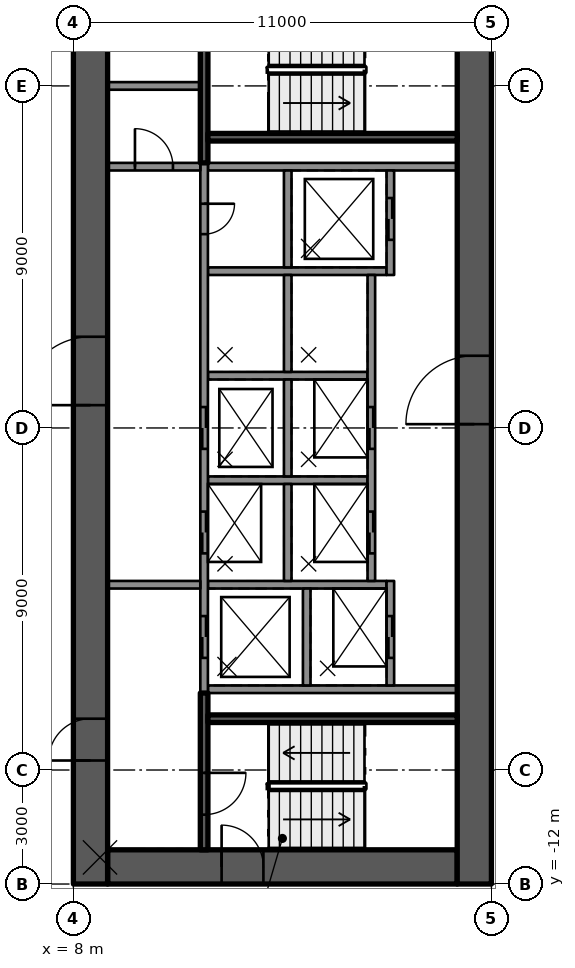
"""IFC4 building model, lengths in metres.
Left out: names, types, materials, properties, quantities, classifications, styles, units other than length and angle.
Written with IfcOpenShell. Run it as: python <this file> out.ifc"""

import sys

from ifc_helpers import new_model, si_unit, direction, frame, frame_2d, origin, place, context, subcontext, project, spatial, rectangle, extrude, element, fill, save


model = new_model("IFC4")
c1 = context("Model", 3, precision=1e-05, world=origin(), true_north=direction((0.0, 1.0)))
c2 = subcontext(c1, "Body", "Model", "MODEL_VIEW")
j1 = project(units=[si_unit("LENGTHUNIT", "METRE"), si_unit("PLANEANGLEUNIT", "RADIAN")], contexts=[c1])
p1 = place(None, origin())
s1 = spatial("IfcSite", under=j1, at=p1, CompositionType="ELEMENT")
p2 = place(p1, origin())
s2 = spatial("IfcBuilding", under=s1, at=p2, CompositionType="ELEMENT")
p3 = place(p2, frame((0.0, 0.0, 105.7)))
s3 = spatial("IfcBuildingStorey", under=s2, at=p3, CompositionType="ELEMENT", Elevation=105.7)
p4 = place(p3, frame((8.9, -11.55, 0.0), z_axis=(0.0, 0.0, 1.0), x_axis=(1.0, 0.0, 0.0)))
e1 = element("IfcWall", 1, at=p4, inside=s3, PredefinedType="SHEAR", context=c2, shape_type="SweptSolid", body=[
    extrude(rectangle(XDim=9.2, YDim=0.9, at=frame_2d((4.6, 0.0))), origin(), (0.0, 0.0, 1.0), 3.5),
])
p5 = place(p4, frame((3.0, 0.0, 0.0)))
e2 = element("IfcOpeningElement", 2, at=p5, cuts=e1, PredefinedType="OPENING", context=c2, shape_type="SweptSolid", body=[
    extrude(rectangle(XDim=1.1, YDim=2.1, at=frame_2d((0.55, 1.05))), frame((0.0, 0.46, 0.0), z_axis=(0.0, -1.0, 0.0), x_axis=(1.0, 0.0, 0.0)), (0.0, 0.0, 1.0), 0.92),
])
p6 = place(p3, frame((8.45, -12.0, 0.0), z_axis=(0.0, 0.0, 1.0), x_axis=(0.0, 1.0, 0.0)))
e3 = element("IfcWall", 3, at=p6, inside=s3, PredefinedType="SHEAR", context=c2, shape_type="SweptSolid", body=[
    extrude(rectangle(XDim=24.0, YDim=0.9, at=frame_2d((12.0, 0.0))), origin(), (0.0, 0.0, 1.0), 3.5),
])
p7 = place(p6, frame((12.6, 0.0, 0.0)))
e4 = element("IfcOpeningElement", 4, at=p7, cuts=e3, PredefinedType="OPENING", context=c2, shape_type="SweptSolid", body=[
    extrude(rectangle(XDim=1.8, YDim=2.1, at=frame_2d((0.9, 1.05))), frame((0.0, 0.46, 0.0), z_axis=(0.0, -1.0, 0.0), x_axis=(1.0, 0.0, 0.0)), (0.0, 0.0, 1.0), 0.92),
])
p8 = place(p6, frame((3.25, 0.0, 0.0)))
e5 = element("IfcOpeningElement", 5, at=p8, cuts=e3, PredefinedType="OPENING", context=c2, shape_type="SweptSolid", body=[
    extrude(rectangle(XDim=1.1, YDim=2.1, at=frame_2d((0.55, 1.05))), frame((0.0, 0.46, 0.0), z_axis=(0.0, -1.0, 0.0), x_axis=(1.0, 0.0, 0.0)), (0.0, 0.0, 1.0), 0.92),
])
p9 = place(p3, frame((18.55, -12.0, 0.0), z_axis=(0.0, 0.0, 1.0), x_axis=(0.0, 1.0, 0.0)))
e6 = element("IfcWall", 6, at=p9, inside=s3, PredefinedType="SHEAR", context=c2, shape_type="SweptSolid", body=[
    extrude(rectangle(XDim=24.0, YDim=0.9, at=frame_2d((12.0, 0.0))), origin(), (0.0, 0.0, 1.0), 3.5),
])
p10 = place(p9, frame((12.1, 0.0, 0.0)))
e7 = element("IfcOpeningElement", 7, at=p10, cuts=e6, PredefinedType="OPENING", context=c2, shape_type="SweptSolid", body=[
    extrude(rectangle(XDim=1.8, YDim=2.1, at=frame_2d((0.9, 1.05))), frame((0.0, 0.46, 0.0), z_axis=(0.0, -1.0, 0.0), x_axis=(1.0, 0.0, 0.0)), (0.0, 0.0, 1.0), 0.92),
])
for number, where, z_axis, x_axis in (
    (8, (11.54, -6.875, 0.0), (0.0, 0.0, 1.0), (1.0, 0.0, 0.0)),
    (9, (11.54, 6.875, 0.0), (0.0, 0.0, 1.0), (1.0, 0.0, 0.0)),
):
    element("IfcWall", number, at=place(p3, frame(where, z_axis=z_axis, x_axis=x_axis)), inside=s3, PredefinedType="SOLIDWALL", context=c2, shape_type="SweptSolid", body=[
        extrude(rectangle(XDim=6.56, YDim=0.2, at=frame_2d((3.28, 0.0))), origin(), (0.0, 0.0, 1.0), 3.09),
    ])
p11 = place(p3, frame((11.54, 4.125, 0.0), z_axis=(0.0, 0.0, 1.0), x_axis=(1.0, 0.0, 0.0)))
e10 = element("IfcWall", 10, at=p11, inside=s3, PredefinedType="SOLIDWALL", context=c2, shape_type="SweptSolid", body=[
    extrude(rectangle(XDim=4.7, YDim=0.2, at=frame_2d((2.35, 0.0))), origin(), (0.0, 0.0, 1.0), 3.09),
])
for number, where, z_axis, x_axis in (
    (11, (11.54, 1.375, 0.0), (0.0, 0.0, 1.0), (1.0, 0.0, 0.0)),
    (12, (11.54, -1.375, 0.0), (0.0, 0.0, 1.0), (1.0, 0.0, 0.0)),
):
    element("IfcWall", number, at=place(p3, frame(where, z_axis=z_axis, x_axis=x_axis)), inside=s3, PredefinedType="SOLIDWALL", context=c2, shape_type="SweptSolid", body=[
        extrude(rectangle(XDim=4.2, YDim=0.2, at=frame_2d((2.1, 0.0))), origin(), (0.0, 0.0, 1.0), 3.09),
    ])
p12 = place(p3, frame((11.54, -4.125, 0.0), z_axis=(0.0, 0.0, 1.0), x_axis=(1.0, 0.0, 0.0)))
e13 = element("IfcWall", 13, at=p12, inside=s3, PredefinedType="SOLIDWALL", context=c2, shape_type="SweptSolid", body=[
    extrude(rectangle(XDim=4.7, YDim=0.2, at=frame_2d((2.35, 0.0))), origin(), (0.0, 0.0, 1.0), 3.09),
])
p13 = place(p3, frame((11.44, 6.975, 0.0), z_axis=(0.0, 0.0, 1.0), x_axis=(0.0, -1.0, 0.0)))
e14 = element("IfcWall", 14, at=p13, inside=s3, PredefinedType="SOLIDWALL", context=c2, shape_type="SweptSolid", body=[
    extrude(rectangle(XDim=13.95, YDim=0.2, at=frame_2d((6.975, 0.0))), origin(), (0.0, 0.0, 1.0), 3.09),
])
p14 = place(p13, frame((6.425, 0.0, 0.0)))
e15 = element("IfcOpeningElement", 15, at=p14, cuts=e14, PredefinedType="OPENING", context=c2, shape_type="SweptSolid", body=[
    extrude(rectangle(XDim=1.1, YDim=2.1, at=frame_2d((0.55, 1.05))), frame((0.0, 0.11, 0.0), z_axis=(0.0, -1.0, 0.0), x_axis=(1.0, 0.0, 0.0)), (0.0, 0.0, 1.0), 0.22),
])
p15 = place(p13, frame((9.175, 0.0, 0.0)))
e16 = element("IfcOpeningElement", 16, at=p15, cuts=e14, PredefinedType="OPENING", context=c2, shape_type="SweptSolid", body=[
    extrude(rectangle(XDim=1.1, YDim=2.1, at=frame_2d((0.55, 1.05))), frame((0.0, 0.11, 0.0), z_axis=(0.0, -1.0, 0.0), x_axis=(1.0, 0.0, 0.0)), (0.0, 0.0, 1.0), 0.22),
])
p16 = place(p13, frame((11.925, 0.0, 0.0)))
e17 = element("IfcOpeningElement", 17, at=p16, cuts=e14, PredefinedType="OPENING", context=c2, shape_type="SweptSolid", body=[
    extrude(rectangle(XDim=1.1, YDim=2.1, at=frame_2d((0.55, 1.05))), frame((0.0, 0.11, 0.0), z_axis=(0.0, -1.0, 0.0), x_axis=(1.0, 0.0, 0.0)), (0.0, 0.0, 1.0), 0.22),
])
p17 = place(p13, frame((1.075, 0.0, 0.0)))
e18 = element("IfcOpeningElement", 18, at=p17, cuts=e14, PredefinedType="OPENING", context=c2, shape_type="SweptSolid", body=[
    extrude(rectangle(XDim=0.8, YDim=2.1, at=frame_2d((0.4, 1.05))), frame((0.0, 0.11, 0.0), z_axis=(0.0, -1.0, 0.0), x_axis=(1.0, 0.0, 0.0)), (0.0, 0.0, 1.0), 0.22),
])
for number, where, z_axis, x_axis in (
    (19, (13.64, 6.775, 0.0), (0.0, 0.0, 1.0), (0.0, -1.0, 0.0)),
    (20, (13.64, 4.025, 0.0), (0.0, 0.0, 1.0), (0.0, -1.0, 0.0)),
    (21, (13.64, 1.275, 0.0), (0.0, 0.0, 1.0), (0.0, -1.0, 0.0)),
    (22, (13.64, -1.475, 0.0), (0.0, 0.0, 1.0), (0.0, -1.0, 0.0)),
    (23, (14.14, -4.225, 0.0), (0.0, 0.0, 1.0), (0.0, -1.0, 0.0)),
):
    element("IfcWall", number, at=place(p3, frame(where, z_axis=z_axis, x_axis=x_axis)), inside=s3, PredefinedType="SOLIDWALL", context=c2, shape_type="SweptSolid", body=[
        extrude(rectangle(XDim=2.55, YDim=0.2, at=frame_2d((1.275, 0.0))), origin(), (0.0, 0.0, 1.0), 3.09),
    ])
p18 = place(p3, frame((16.34, 6.775, 0.0), z_axis=(0.0, 0.0, 1.0), x_axis=(0.0, -1.0, 0.0)))
e24 = element("IfcWall", 24, at=p18, inside=s3, PredefinedType="SOLIDWALL", context=c2, shape_type="SweptSolid", body=[
    extrude(rectangle(XDim=2.75, YDim=0.2, at=frame_2d((1.375, 0.0))), origin(), (0.0, 0.0, 1.0), 3.09),
])
p19 = place(p18, frame((0.725, 0.0, 0.0)))
e25 = element("IfcOpeningElement", 25, at=p19, cuts=e24, PredefinedType="OPENING", context=c2, shape_type="SweptSolid", body=[
    extrude(rectangle(XDim=1.1, YDim=2.1, at=frame_2d((0.55, 1.05))), frame((0.0, 0.11, 0.0), z_axis=(0.0, -1.0, 0.0), x_axis=(1.0, 0.0, 0.0)), (0.0, 0.0, 1.0), 0.22),
])
p20 = place(p3, frame((15.84, 4.025, 0.0), z_axis=(0.0, 0.0, 1.0), x_axis=(0.0, -1.0, 0.0)))
e26 = element("IfcWall", 26, at=p20, inside=s3, PredefinedType="SOLIDWALL", context=c2, shape_type="SweptSolid", body=[
    extrude(rectangle(XDim=8.05, YDim=0.2, at=frame_2d((4.025, 0.0))), origin(), (0.0, 0.0, 1.0), 3.09),
])
p21 = place(p20, frame((3.475, 0.0, 0.0)))
e27 = element("IfcOpeningElement", 27, at=p21, cuts=e26, PredefinedType="OPENING", context=c2, shape_type="SweptSolid", body=[
    extrude(rectangle(XDim=1.1, YDim=2.1, at=frame_2d((0.55, 1.05))), frame((0.0, 0.11, 0.0), z_axis=(0.0, -1.0, 0.0), x_axis=(1.0, 0.0, 0.0)), (0.0, 0.0, 1.0), 0.22),
])
p22 = place(p20, frame((6.225, 0.0, 0.0)))
e28 = element("IfcOpeningElement", 28, at=p22, cuts=e26, PredefinedType="OPENING", context=c2, shape_type="SweptSolid", body=[
    extrude(rectangle(XDim=1.1, YDim=2.1, at=frame_2d((0.55, 1.05))), frame((0.0, 0.11, 0.0), z_axis=(0.0, -1.0, 0.0), x_axis=(1.0, 0.0, 0.0)), (0.0, 0.0, 1.0), 0.22),
])
p23 = place(p3, frame((16.34, -4.025, 0.0), z_axis=(0.0, 0.0, 1.0), x_axis=(0.0, -1.0, 0.0)))
e29 = element("IfcWall", 29, at=p23, inside=s3, PredefinedType="SOLIDWALL", context=c2, shape_type="SweptSolid", body=[
    extrude(rectangle(XDim=2.75, YDim=0.2, at=frame_2d((1.375, 0.0))), origin(), (0.0, 0.0, 1.0), 3.09),
])
p24 = place(p23, frame((0.925, 0.0, 0.0)))
e30 = element("IfcOpeningElement", 30, at=p24, cuts=e29, PredefinedType="OPENING", context=c2, shape_type="SweptSolid", body=[
    extrude(rectangle(XDim=1.1, YDim=2.1, at=frame_2d((0.55, 1.05))), frame((0.0, 0.11, 0.0), z_axis=(0.0, -1.0, 0.0), x_axis=(1.0, 0.0, 0.0)), (0.0, 0.0, 1.0), 0.22),
])
p25 = place(p3, frame((11.44, -6.975, 0.0), z_axis=(0.0, 0.0, 1.0), x_axis=(0.0, -1.0, 0.0)))
e31 = element("IfcWall", 31, at=p25, inside=s3, PredefinedType="SOLIDWALL", context=c2, shape_type="SweptSolid", body=[
    extrude(rectangle(XDim=4.125, YDim=0.2, at=frame_2d((2.062, 0.0))), origin(), (0.0, 0.0, 1.0), 3.09),
])
p26 = place(p25, frame((2.1, 0.0, 0.0)))
e32 = element("IfcOpeningElement", 32, at=p26, cuts=e31, PredefinedType="OPENING", context=c2, shape_type="SweptSolid", body=[
    extrude(rectangle(XDim=1.1, YDim=2.1, at=frame_2d((0.55, 1.05))), frame((0.0, 0.11, 0.0), z_axis=(0.0, -1.0, 0.0), x_axis=(1.0, 0.0, 0.0)), (0.0, 0.0, 1.0), 0.22),
])
p27 = place(p3, frame((11.54, -7.65, 0.0), z_axis=(0.0, 0.0, 1.0), x_axis=(1.0, 0.0, 0.0)))
e33 = element("IfcWall", 33, at=p27, inside=s3, PredefinedType="SOLIDWALL", context=c2, shape_type="SweptSolid", body=[
    extrude(rectangle(XDim=6.56, YDim=0.2, at=frame_2d((3.28, 0.0))), origin(), (0.0, 0.0, 1.0), 3.09),
])
p28 = place(p3, frame((11.44, 11.1, 0.0), z_axis=(0.0, 0.0, 1.0), x_axis=(0.0, -1.0, 0.0)))
e34 = element("IfcWall", 34, at=p28, inside=s3, PredefinedType="SOLIDWALL", context=c2, shape_type="SweptSolid", body=[
    extrude(rectangle(XDim=4.125, YDim=0.2, at=frame_2d((2.062, 0.0))), origin(), (0.0, 0.0, 1.0), 3.09),
])
p29 = place(p3, frame((11.54, 7.65, 0.0), z_axis=(0.0, 0.0, 1.0), x_axis=(1.0, 0.0, 0.0)))
e35 = element("IfcWall", 35, at=p29, inside=s3, PredefinedType="SOLIDWALL", context=c2, shape_type="SweptSolid", body=[
    extrude(rectangle(XDim=6.56, YDim=0.2, at=frame_2d((3.28, 0.0))), origin(), (0.0, 0.0, 1.0), 3.09),
])
p30 = place(p3, frame((8.9, -4.125, 0.0), z_axis=(0.0, 0.0, 1.0), x_axis=(1.0, 0.0, 0.0)))
e36 = element("IfcWall", 36, at=p30, inside=s3, PredefinedType="PARTITIONING", context=c2, shape_type="SweptSolid", body=[
    extrude(rectangle(XDim=2.44, YDim=0.2, at=frame_2d((1.22, 0.0))), origin(), (0.0, 0.0, 1.0), 3.09),
])
p31 = place(p3, frame((8.9, 6.875, 0.0), z_axis=(0.0, 0.0, 1.0), x_axis=(1.0, 0.0, 0.0)))
e37 = element("IfcWall", 37, at=p31, inside=s3, PredefinedType="PARTITIONING", context=c2, shape_type="SweptSolid", body=[
    extrude(rectangle(XDim=2.44, YDim=0.2, at=frame_2d((1.22, 0.0))), origin(), (0.0, 0.0, 1.0), 3.09),
])
p32 = place(p31, frame((0.72, 0.0, 0.0)))
e38 = element("IfcOpeningElement", 38, at=p32, cuts=e37, PredefinedType="OPENING", context=c2, shape_type="SweptSolid", body=[
    extrude(rectangle(XDim=1.0, YDim=2.1, at=frame_2d((0.5, 1.05))), frame((0.0, 0.11, 0.0), z_axis=(0.0, -1.0, 0.0), x_axis=(1.0, 0.0, 0.0)), (0.0, 0.0, 1.0), 0.22),
])
p33 = place(p3, frame((8.9, 9.0, 0.0), z_axis=(0.0, 0.0, 1.0), x_axis=(1.0, 0.0, 0.0)))
e39 = element("IfcWall", 39, at=p33, inside=s3, PredefinedType="PARTITIONING", context=c2, shape_type="SweptSolid", body=[
    extrude(rectangle(XDim=2.44, YDim=0.2, at=frame_2d((1.22, 0.0))), origin(), (0.0, 0.0, 1.0), 3.09),
])
p34 = place(p19, origin())
e40 = element("IfcDoor", 40, at=p34, inside=s3, OperationType="DOUBLE_DOOR_SLIDING", PredefinedType="DOOR", context=c2, shape_type="SweptSolid", body=[
    extrude(rectangle(XDim=1.1, YDim=2.1, at=frame_2d((0.55, 1.05))), frame((0.0, 0.025, 0.0), z_axis=(0.0, -1.0, 0.0), x_axis=(1.0, 0.0, 0.0)), (0.0, 0.0, 1.0), 0.05),
])
fill(e25, e40)
p35 = place(p14, origin())
e41 = element("IfcDoor", 41, at=p35, inside=s3, OperationType="DOUBLE_DOOR_SLIDING", PredefinedType="DOOR", context=c2, shape_type="SweptSolid", body=[
    extrude(rectangle(XDim=1.1, YDim=2.1, at=frame_2d((0.55, 1.05))), frame((0.0, 0.025, 0.0), z_axis=(0.0, -1.0, 0.0), x_axis=(1.0, 0.0, 0.0)), (0.0, 0.0, 1.0), 0.05),
])
fill(e15, e41)
p36 = place(p21, origin())
e42 = element("IfcDoor", 42, at=p36, inside=s3, OperationType="DOUBLE_DOOR_SLIDING", PredefinedType="DOOR", context=c2, shape_type="SweptSolid", body=[
    extrude(rectangle(XDim=1.1, YDim=2.1, at=frame_2d((0.55, 1.05))), frame((0.0, 0.025, 0.0), z_axis=(0.0, -1.0, 0.0), x_axis=(1.0, 0.0, 0.0)), (0.0, 0.0, 1.0), 0.05),
])
fill(e27, e42)
p37 = place(p15, origin())
e43 = element("IfcDoor", 43, at=p37, inside=s3, OperationType="DOUBLE_DOOR_SLIDING", PredefinedType="DOOR", context=c2, shape_type="SweptSolid", body=[
    extrude(rectangle(XDim=1.1, YDim=2.1, at=frame_2d((0.55, 1.05))), frame((0.0, 0.025, 0.0), z_axis=(0.0, -1.0, 0.0), x_axis=(1.0, 0.0, 0.0)), (0.0, 0.0, 1.0), 0.05),
])
fill(e16, e43)
p38 = place(p22, origin())
e44 = element("IfcDoor", 44, at=p38, inside=s3, OperationType="DOUBLE_DOOR_SLIDING", PredefinedType="DOOR", context=c2, shape_type="SweptSolid", body=[
    extrude(rectangle(XDim=1.1, YDim=2.1, at=frame_2d((0.55, 1.05))), frame((0.0, 0.025, 0.0), z_axis=(0.0, -1.0, 0.0), x_axis=(1.0, 0.0, 0.0)), (0.0, 0.0, 1.0), 0.05),
])
fill(e28, e44)
p39 = place(p16, origin())
e45 = element("IfcDoor", 45, at=p39, inside=s3, OperationType="DOUBLE_DOOR_SLIDING", PredefinedType="DOOR", context=c2, shape_type="SweptSolid", body=[
    extrude(rectangle(XDim=1.1, YDim=2.1, at=frame_2d((0.55, 1.05))), frame((0.0, 0.025, 0.0), z_axis=(0.0, -1.0, 0.0), x_axis=(1.0, 0.0, 0.0)), (0.0, 0.0, 1.0), 0.05),
])
fill(e17, e45)
p40 = place(p24, origin())
e46 = element("IfcDoor", 46, at=p40, inside=s3, OperationType="DOUBLE_DOOR_SLIDING", PredefinedType="DOOR", context=c2, shape_type="SweptSolid", body=[
    extrude(rectangle(XDim=1.1, YDim=2.1, at=frame_2d((0.55, 1.05))), frame((0.0, 0.025, 0.0), z_axis=(0.0, -1.0, 0.0), x_axis=(1.0, 0.0, 0.0)), (0.0, 0.0, 1.0), 0.05),
])
fill(e30, e46)
p41 = place(p17, origin())
e47 = element("IfcDoor", 47, at=p41, inside=s3, OperationType="SINGLE_SWING_LEFT", PredefinedType="DOOR", context=c2, shape_type="SweptSolid", body=[
    extrude(rectangle(XDim=0.8, YDim=2.1, at=frame_2d((0.4, 1.05))), frame((0.0, 0.025, 0.0), z_axis=(0.0, -1.0, 0.0), x_axis=(1.0, 0.0, 0.0)), (0.0, 0.0, 1.0), 0.05),
])
fill(e18, e47)
p42 = place(p7, origin())
e48 = element("IfcDoor", 48, at=p42, inside=s3, OperationType="SINGLE_SWING_RIGHT", PredefinedType="DOOR", context=c2, shape_type="SweptSolid", body=[
    extrude(rectangle(XDim=1.8, YDim=2.1, at=frame_2d((0.9, 1.05))), frame((0.0, 0.025, 0.0), z_axis=(0.0, -1.0, 0.0), x_axis=(1.0, 0.0, 0.0)), (0.0, 0.0, 1.0), 0.05),
])
fill(e4, e48)
p43 = place(p10, origin())
e49 = element("IfcDoor", 49, at=p43, inside=s3, OperationType="SINGLE_SWING_RIGHT", PredefinedType="DOOR", context=c2, shape_type="SweptSolid", body=[
    extrude(rectangle(XDim=1.8, YDim=2.1, at=frame_2d((0.9, 1.05))), frame((0.0, 0.025, 0.0), z_axis=(0.0, -1.0, 0.0), x_axis=(1.0, 0.0, 0.0)), (0.0, 0.0, 1.0), 0.05),
])
fill(e7, e49)
p44 = place(p8, origin())
e50 = element("IfcDoor", 50, at=p44, inside=s3, OperationType="SINGLE_SWING_LEFT", PredefinedType="DOOR", context=c2, shape_type="SweptSolid", body=[
    extrude(rectangle(XDim=1.1, YDim=2.1, at=frame_2d((0.55, 1.05))), frame((0.0, 0.025, 0.0), z_axis=(0.0, -1.0, 0.0), x_axis=(1.0, 0.0, 0.0)), (0.0, 0.0, 1.0), 0.05),
])
fill(e5, e50)
p45 = place(p5, origin())
e51 = element("IfcDoor", 51, at=p45, inside=s3, OperationType="SINGLE_SWING_LEFT", PredefinedType="DOOR", context=c2, shape_type="SweptSolid", body=[
    extrude(rectangle(XDim=1.1, YDim=2.1, at=frame_2d((0.55, 1.05))), frame((0.0, 0.025, 0.0), z_axis=(0.0, -1.0, 0.0), x_axis=(1.0, 0.0, 0.0)), (0.0, 0.0, 1.0), 0.05),
])
fill(e2, e51)
p46 = place(p26, origin())
e52 = element("IfcDoor", 52, at=p46, inside=s3, OperationType="SINGLE_SWING_RIGHT", PredefinedType="DOOR", context=c2, shape_type="SweptSolid", body=[
    extrude(rectangle(XDim=1.1, YDim=2.1, at=frame_2d((0.55, 1.05))), frame((0.0, 0.025, 0.0), z_axis=(0.0, -1.0, 0.0), x_axis=(1.0, 0.0, 0.0)), (0.0, 0.0, 1.0), 0.05),
])
fill(e32, e52)
p47 = place(p32, origin())
e53 = element("IfcDoor", 53, at=p47, inside=s3, OperationType="SINGLE_SWING_RIGHT", PredefinedType="DOOR", context=c2, shape_type="SweptSolid", body=[
    extrude(rectangle(XDim=1.0, YDim=2.1, at=frame_2d((0.5, 1.05))), frame((0.0, 0.025, 0.0), z_axis=(0.0, -1.0, 0.0), x_axis=(1.0, 0.0, 0.0)), (0.0, 0.0, 1.0), 0.05),
])
fill(e38, e53)
save(model, sys.argv[1])
